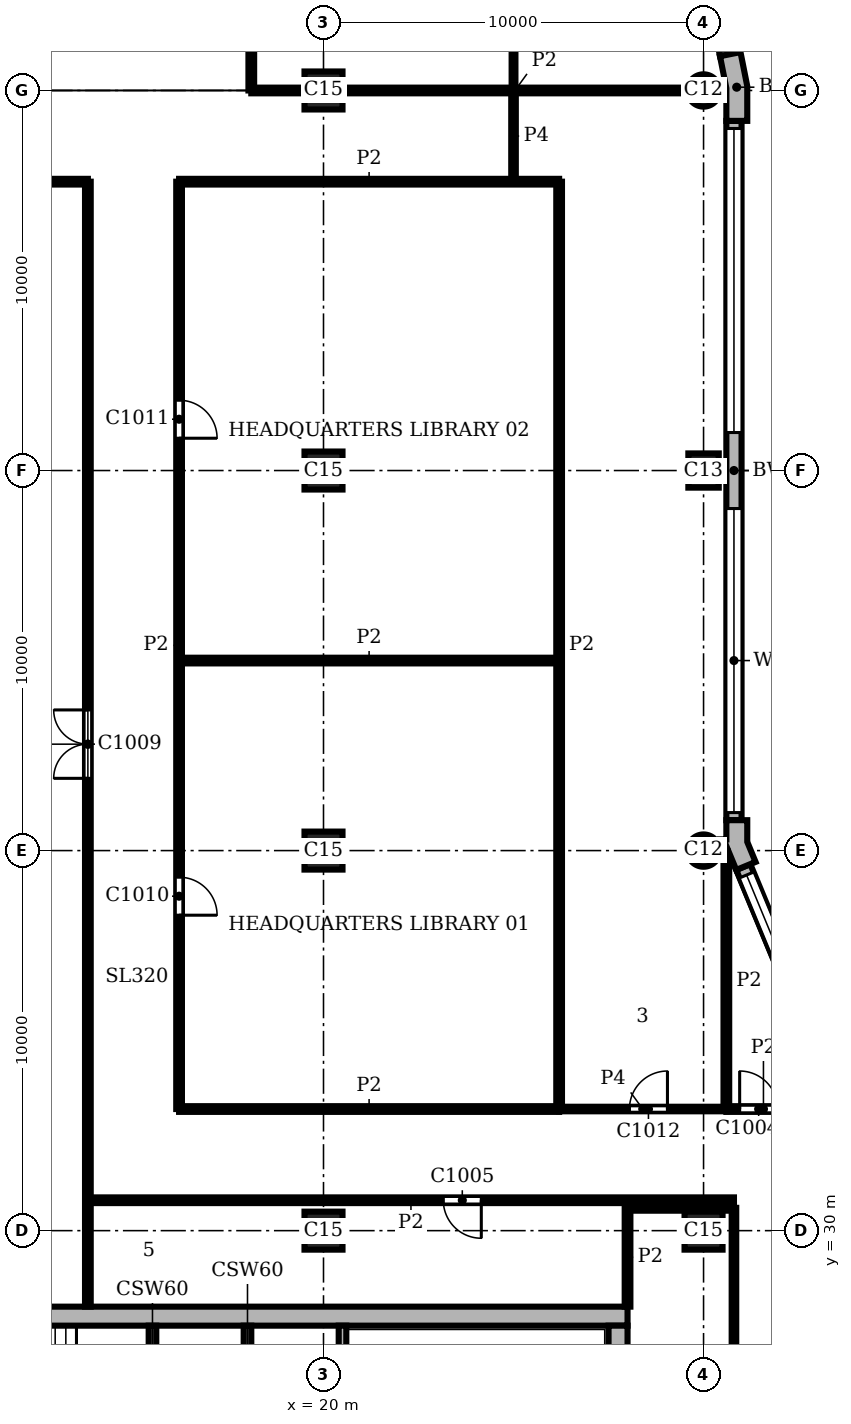
"""IFC4 building model, lengths in metres.
Left out: names, types, materials, properties, quantities, classifications, styles, units other than length and angle.
Written with IfcOpenShell. Run it as: python <this file> out.ifc"""

import sys

from ifc_helpers import new_model, si_unit, direction, frame, frame_2d, origin, origin_2d, place, context, subcontext, project, spatial, polyline, rectangle, circle, outline, extrude, element, fill, save


model = new_model("IFC4")
c1 = context("Model", 3, precision=1e-05, world=origin(), true_north=direction((0.0, 1.0)))
c2 = subcontext(c1, "Body", "Model", "MODEL_VIEW")
j1 = project(units=[si_unit("LENGTHUNIT", "METRE"), si_unit("PLANEANGLEUNIT", "RADIAN")], contexts=[c1])
p1 = place(None, origin())
s1 = spatial("IfcSite", under=j1, at=p1, CompositionType="ELEMENT")
p2 = place(p1, origin())
s2 = spatial("IfcBuilding", under=s1, at=p2, CompositionType="ELEMENT")
p3 = place(p2, frame((0.0, 0.0, 348.9)))
s3 = spatial("IfcBuildingStorey", under=s2, at=p3, CompositionType="ELEMENT", Elevation=348.9)
p4 = place(p3, frame((30.0, 40.0, 0.0), z_axis=(0.0, 0.0, 1.0), x_axis=(1.0, 0.0, 0.0)))
e1 = element("IfcColumn", 1, at=p4, inside=s3, PredefinedType="COLUMN", context=c2, shape_type="SweptSolid", body=[
    extrude(circle(Radius=0.425, at=origin_2d()), origin(), (0.0, 0.0, 1.0), 3.9),
])
p5 = place(p3, frame((30.0, 50.0, 0.0), z_axis=(0.0, 0.0, 1.0), x_axis=(0.0, 1.0, 0.0)))
e2 = element("IfcColumn", 2, at=p5, inside=s3, PredefinedType="COLUMN", context=c2, shape_type="SweptSolid", body=[
    extrude(rectangle(XDim=0.9, YDim=0.8, at=origin_2d()), origin(), (0.0, 0.0, 1.0), 3.9),
])
p6 = place(p3, frame((30.0, 60.0, 0.0), z_axis=(0.0, 0.0, 1.0), x_axis=(1.0, 0.0, 0.0)))
e3 = element("IfcColumn", 3, at=p6, inside=s3, PredefinedType="COLUMN", context=c2, shape_type="SweptSolid", body=[
    extrude(circle(Radius=0.425, at=origin_2d()), origin(), (0.0, 0.0, 1.0), 3.9),
])
for number, where, z_axis, x_axis in (
    (4, (20.0, 30.0, 0.0), (0.0, 0.0, 1.0), (1.0, 0.0, 0.0)),
    (5, (20.0, 40.0, 0.0), (0.0, 0.0, 1.0), (1.0, 0.0, 0.0)),
    (6, (20.0, 50.0, 0.0), (0.0, 0.0, 1.0), (1.0, 0.0, 0.0)),
    (7, (20.0, 60.0, 0.0), (0.0, 0.0, 1.0), (1.0, 0.0, 0.0)),
    (8, (30.0, 30.0, 0.0), (0.0, 0.0, 1.0), (1.0, 0.0, 0.0)),
):
    element("IfcColumn", number, at=place(p3, frame(where, z_axis=z_axis, x_axis=x_axis)), inside=s3, PredefinedType="COLUMN", context=c2, shape_type="SweptSolid", body=[
        extrude(rectangle(XDim=1.0, YDim=1.0, at=origin_2d()), origin(), (0.0, 0.0, 1.0), 3.9),
    ])
p7 = place(p3, frame((27.75, 8.5, 0.0), z_axis=(0.0, 0.0, 1.0), x_axis=(0.0, 1.0, 0.0)))
e9 = element("IfcWall", 9, at=p7, inside=s3, PredefinedType="SHEAR", context=c2, shape_type="SweptSolid", body=[
    extrude(rectangle(XDim=19.0, YDim=0.5, at=frame_2d((9.5, 0.0))), origin(), (0.0, 0.0, 1.0), 3.9),
])
p8 = place(p7, frame((4.95, 0.0, 0.0)))
e10 = element("IfcOpeningElement", 10, at=p8, cuts=e9, PredefinedType="OPENING", context=c2, shape_type="SweptSolid", body=[
    extrude(rectangle(XDim=1.6, YDim=2.1, at=frame_2d((0.8, 1.05))), frame((0.0, 0.26, 0.0), z_axis=(0.0, -1.0, 0.0), x_axis=(1.0, 0.0, 0.0)), (0.0, 0.0, 1.0), 0.52),
])
p9 = place(p3, frame((28.0, 27.75, 0.0), z_axis=(0.0, 0.0, 1.0), x_axis=(-1.0, 0.0, 0.0)))
e11 = element("IfcWall", 11, at=p9, inside=s3, PredefinedType="SHEAR", context=c2, shape_type="SweptSolid", body=[
    extrude(rectangle(XDim=20.0, YDim=0.5, at=frame_2d((10.0, 0.0))), origin(), (0.0, 0.0, 1.0), 3.9),
])
p10 = place(p3, origin())
e12 = element("IfcWall", 12, at=p10, inside=s3, PredefinedType="SOLIDWALL", context=c2, shape_type="SweptSolid", body=[
    extrude(outline(polyline([(30.62, 39.995), (30.62, 40.071), (30.861, 39.49), (31.23, 39.644), (31.369, 39.701), (31.15, 40.229), (31.15, 40.8), (31.0, 40.8), (30.6, 40.8), (30.6, 40.295), (30.425, 40.295), (30.425, 39.995), (30.62, 39.995)])), origin(), (0.0, 0.0, 1.0), 3.9),
])
e13 = element("IfcWall", 13, at=p10, inside=s3, PredefinedType="SOLIDWALL", context=c2, shape_type="SweptSolid", body=[
    extrude(outline(polyline([(31.0, 59.2), (31.15, 59.2), (31.15, 60.113), (30.972, 61.009), (30.825, 60.98), (30.432, 60.902), (30.6, 60.059), (30.6, 59.2), (31.0, 59.2)])), origin(), (0.0, 0.0, 1.0), 3.9),
])
p11 = place(p3, frame((33.362, 33.974, 0.0), z_axis=(0.0, 0.0, 1.0), x_axis=(-0.382655745237, 0.923891000409, 0.0)))
e14 = element("IfcWall", 14, at=p11, inside=s3, PredefinedType="SOLIDWALL", context=c2, shape_type="SweptSolid", body=[
    extrude(rectangle(XDim=6.053, YDim=0.4, at=frame_2d((3.027, 0.0))), origin(), (0.0, 0.0, 1.0), 3.9),
])
p12 = place(p11, frame((0.227, 0.0, 0.9)))
e15 = element("IfcOpeningElement", 15, at=p12, cuts=e14, PredefinedType="OPENING", context=c2, shape_type="SweptSolid", body=[
    extrude(rectangle(XDim=5.6, YDim=2.35, at=frame_2d((2.8, 1.175))), frame((0.0, 0.21, 0.0), z_axis=(0.0, -1.0, 0.0), x_axis=(1.0, 0.0, 0.0)), (0.0, 0.0, 1.0), 0.42),
])
p13 = place(p3, frame((30.8, 40.8, 0.0), z_axis=(0.0, 0.0, 1.0), x_axis=(0.0, 1.0, 0.0)))
e16 = element("IfcWall", 16, at=p13, inside=s3, PredefinedType="SOLIDWALL", context=c2, shape_type="SweptSolid", body=[
    extrude(rectangle(XDim=18.4, YDim=0.4, at=frame_2d((9.2, 0.0))), origin(), (0.0, 0.0, 1.0), 3.9),
])
p14 = place(p13, frame((0.2, 0.0, 0.9)))
e17 = element("IfcOpeningElement", 17, at=p14, cuts=e16, PredefinedType="OPENING", context=c2, shape_type="SweptSolid", body=[
    extrude(rectangle(XDim=8.0, YDim=2.35, at=frame_2d((4.0, 1.175))), frame((0.0, 0.21, 0.0), z_axis=(0.0, -1.0, 0.0), x_axis=(1.0, 0.0, 0.0)), (0.0, 0.0, 1.0), 0.42),
])
p15 = place(p13, frame((10.2, 0.0, 0.9)))
e18 = element("IfcOpeningElement", 18, at=p15, cuts=e16, PredefinedType="OPENING", context=c2, shape_type="SweptSolid", body=[
    extrude(rectangle(XDim=8.0, YDim=2.35, at=frame_2d((4.0, 1.175))), frame((0.0, 0.21, 0.0), z_axis=(0.0, -1.0, 0.0), x_axis=(1.0, 0.0, 0.0)), (0.0, 0.0, 1.0), 0.42),
])
p16 = place(p3, frame((30.629, 60.941, 0.0), z_axis=(0.0, 0.0, 1.0), x_axis=(-0.195098533057, 0.98078364709, 0.0)))
e19 = element("IfcWall", 19, at=p16, inside=s3, PredefinedType="SOLIDWALL", context=c2, shape_type="SweptSolid", body=[
    extrude(rectangle(XDim=4.753, YDim=0.4, at=frame_2d((2.376, 0.0))), origin(), (0.0, 0.0, 1.0), 3.9),
])
p17 = place(p16, frame((0.226, 0.0, 0.9)))
e20 = element("IfcOpeningElement", 20, at=p17, cuts=e19, PredefinedType="OPENING", context=c2, shape_type="SweptSolid", body=[
    extrude(rectangle(XDim=4.3, YDim=2.35, at=frame_2d((2.15, 1.175))), frame((0.0, 0.21, 0.0), z_axis=(0.0, -1.0, 0.0), x_axis=(1.0, 0.0, 0.0)), (0.0, 0.0, 1.0), 0.42),
])
p18 = place(p3, frame((15.5, 23.6, 0.0), z_axis=(0.0, 0.0, 1.0), x_axis=(0.0, 1.0, 0.0)))
e21 = element("IfcWall", 21, at=p18, inside=s3, PredefinedType="SHEAR", context=c2, shape_type="SweptSolid", body=[
    extrude(rectangle(XDim=3.9, YDim=0.2, at=frame_2d((1.95, 0.0))), origin(), (0.0, 0.0, 1.0), 3.45),
])
p19 = place(p3, frame((18.0, 20.0, 0.0), z_axis=(0.0, 0.0, 1.0), x_axis=(0.0, 1.0, 0.0)))
e22 = element("IfcWall", 22, at=p19, inside=s3, PredefinedType="SHEAR", context=c2, shape_type="SweptSolid", body=[
    extrude(rectangle(XDim=7.5, YDim=0.2, at=frame_2d((3.75, 0.0))), origin(), (0.0, 0.0, 1.0), 3.45),
])
p20 = place(p19, frame((1.2, 0.0, 0.0)))
e23 = element("IfcOpeningElement", 23, at=p20, cuts=e22, PredefinedType="OPENING", context=c2, shape_type="SweptSolid", body=[
    extrude(rectangle(XDim=1.2, YDim=2.1, at=frame_2d((0.6, 1.05))), frame((0.0, 0.11, 0.0), z_axis=(0.0, -1.0, 0.0), x_axis=(1.0, 0.0, 0.0)), (0.0, 0.0, 1.0), 0.22),
])
p21 = place(p3, frame((20.5, 23.6, 0.0), z_axis=(0.0, 0.0, 1.0), x_axis=(0.0, 1.0, 0.0)))
e24 = element("IfcWall", 24, at=p21, inside=s3, PredefinedType="SHEAR", context=c2, shape_type="SweptSolid", body=[
    extrude(rectangle(XDim=3.9, YDim=0.2, at=frame_2d((1.95, 0.0))), origin(), (0.0, 0.0, 1.0), 3.45),
])
p22 = place(p3, frame((25.0, 60.0, 0.0), z_axis=(0.0, 0.0, 1.0), x_axis=(0.0, 1.0, 0.0)))
e25 = element("IfcWall", 25, at=p22, inside=s3, PredefinedType="PARTITIONING", context=c2, shape_type="SweptSolid", body=[
    extrude(rectangle(XDim=8.0, YDim=0.1, at=frame_2d((4.0, 0.0))), origin(), (0.0, 0.0, 1.0), 3.45),
])
p23 = place(p22, frame((2.6, 0.0, 0.0)))
e26 = element("IfcOpeningElement", 26, at=p23, cuts=e25, PredefinedType="OPENING", context=c2, shape_type="SweptSolid", body=[
    extrude(rectangle(XDim=0.9, YDim=2.1, at=frame_2d((0.45, 1.05))), frame((0.0, 0.06, 0.0), z_axis=(0.0, -1.0, 0.0), x_axis=(1.0, 0.0, 0.0)), (0.0, 0.0, 1.0), 0.12),
])
p24 = place(p3, frame((13.8, 28.0, 0.0), z_axis=(0.0, 0.0, 1.0), x_axis=(0.0, 1.0, 0.0)))
e27 = element("IfcWall", 27, at=p24, inside=s3, PredefinedType="PARTITIONING", context=c2, shape_type="SweptSolid", body=[
    extrude(rectangle(XDim=29.6, YDim=0.15, at=frame_2d((14.8, 0.0))), origin(), (0.0, 0.0, 1.0), 3.45),
])
p25 = place(p24, frame((13.901, 0.0, 0.0)))
e28 = element("IfcOpeningElement", 28, at=p25, cuts=e27, PredefinedType="OPENING", context=c2, shape_type="SweptSolid", body=[
    extrude(rectangle(XDim=1.8, YDim=2.1, at=frame_2d((0.9, 1.05))), frame((0.0, 0.085, 0.0), z_axis=(0.0, -1.0, 0.0), x_axis=(1.0, 0.0, 0.0)), (0.0, 0.0, 1.0), 0.17),
])
p26 = place(p3, frame((16.2, 33.2, 0.0), z_axis=(0.0, 0.0, 1.0), x_axis=(0.0, 1.0, 0.0)))
e29 = element("IfcWall", 29, at=p26, inside=s3, PredefinedType="PARTITIONING", context=c2, shape_type="SweptSolid", body=[
    extrude(rectangle(XDim=24.4, YDim=0.15, at=frame_2d((12.2, 0.0))), origin(), (0.0, 0.0, 1.0), 3.45),
])
p27 = place(p26, frame((5.1, 0.0, 0.0)))
e30 = element("IfcOpeningElement", 30, at=p27, cuts=e29, PredefinedType="OPENING", context=c2, shape_type="SweptSolid", body=[
    extrude(rectangle(XDim=1.0, YDim=2.1, at=frame_2d((0.5, 1.05))), frame((0.0, 0.085, 0.0), z_axis=(0.0, -1.0, 0.0), x_axis=(1.0, 0.0, 0.0)), (0.0, 0.0, 1.0), 0.17),
])
p28 = place(p26, frame((17.65, 0.0, 0.0)))
e31 = element("IfcOpeningElement", 31, at=p28, cuts=e29, PredefinedType="OPENING", context=c2, shape_type="SweptSolid", body=[
    extrude(rectangle(XDim=1.0, YDim=2.1, at=frame_2d((0.5, 1.05))), frame((0.0, 0.085, 0.0), z_axis=(0.0, -1.0, 0.0), x_axis=(1.0, 0.0, 0.0)), (0.0, 0.0, 1.0), 0.17),
])
p29 = place(p3, frame((18.1, 60.0, 0.0), z_axis=(0.0, 0.0, 1.0), x_axis=(0.0, 1.0, 0.0)))
e32 = element("IfcWall", 32, at=p29, inside=s3, PredefinedType="PARTITIONING", context=c2, shape_type="SweptSolid", body=[
    extrude(rectangle(XDim=6.4, YDim=0.15, at=frame_2d((3.2, 0.0))), origin(), (0.0, 0.0, 1.0), 3.45),
])
p30 = place(p29, frame((2.35, 0.0, 0.0)))
e33 = element("IfcOpeningElement", 33, at=p30, cuts=e32, PredefinedType="OPENING", context=c2, shape_type="SweptSolid", body=[
    extrude(rectangle(XDim=1.0, YDim=2.1, at=frame_2d((0.5, 1.05))), frame((0.0, 0.085, 0.0), z_axis=(0.0, -1.0, 0.0), x_axis=(1.0, 0.0, 0.0)), (0.0, 0.0, 1.0), 0.17),
])
p31 = place(p3, frame((26.2, 33.2, 0.0), z_axis=(0.0, 0.0, 1.0), x_axis=(0.0, 1.0, 0.0)))
e34 = element("IfcWall", 34, at=p31, inside=s3, PredefinedType="PARTITIONING", context=c2, shape_type="SweptSolid", body=[
    extrude(rectangle(XDim=24.4, YDim=0.15, at=frame_2d((12.2, 0.0))), origin(), (0.0, 0.0, 1.0), 3.45),
])
p32 = place(p3, frame((28.0, 28.0, 0.0), z_axis=(0.0, 0.0, 1.0), x_axis=(0.0, 1.0, 0.0)))
e35 = element("IfcWall", 35, at=p32, inside=s3, PredefinedType="PARTITIONING", context=c2, shape_type="SweptSolid", body=[
    extrude(rectangle(XDim=2.598, YDim=0.15, at=frame_2d((1.299, 0.0))), origin(), (0.0, 0.0, 1.0), 3.45),
])
p33 = place(p3, frame((30.6, 33.2, 0.0), z_axis=(0.0, 0.0, 1.0), x_axis=(0.0, 1.0, 0.0)))
e36 = element("IfcWall", 36, at=p33, inside=s3, PredefinedType="PARTITIONING", context=c2, shape_type="SweptSolid", body=[
    extrude(rectangle(XDim=6.738, YDim=0.15, at=frame_2d((3.369, 0.0))), origin(), (0.0, 0.0, 1.0), 3.45),
])
p34 = place(p3, frame((28.002, 30.6, 0.0), z_axis=(0.0, 0.0, 1.0), x_axis=(1.0, 0.0, 0.0)))
e37 = element("IfcWall", 37, at=p34, inside=s3, PredefinedType="PARTITIONING", context=c2, shape_type="SweptSolid", body=[
    extrude(rectangle(XDim=2.798, YDim=0.15, at=frame_2d((1.399, 0.0))), origin(), (0.0, 0.0, 1.0), 3.45),
])
p35 = place(p3, frame((13.802, 30.8, 0.0), z_axis=(0.0, 0.0, 1.0), x_axis=(1.0, 0.0, 0.0)))
e38 = element("IfcWall", 38, at=p35, inside=s3, PredefinedType="PARTITIONING", context=c2, shape_type="SweptSolid", body=[
    extrude(rectangle(XDim=16.998, YDim=0.15, at=frame_2d((8.499, 0.0))), origin(), (0.0, 0.0, 1.0), 3.45),
])
p36 = place(p35, frame((9.35, 0.0, 0.0)))
e39 = element("IfcOpeningElement", 39, at=p36, cuts=e38, PredefinedType="OPENING", context=c2, shape_type="SweptSolid", body=[
    extrude(rectangle(XDim=1.0, YDim=2.1, at=frame_2d((0.5, 1.05))), frame((0.0, 0.085, 0.0), z_axis=(0.0, -1.0, 0.0), x_axis=(1.0, 0.0, 0.0)), (0.0, 0.0, 1.0), 0.17),
])
p37 = place(p3, frame((16.2, 33.2, 0.0), z_axis=(0.0, 0.0, 1.0), x_axis=(1.0, 0.0, 0.0)))
e40 = element("IfcWall", 40, at=p37, inside=s3, PredefinedType="PARTITIONING", context=c2, shape_type="SweptSolid", body=[
    extrude(rectangle(XDim=10.0, YDim=0.15, at=frame_2d((5.0, 0.0))), origin(), (0.0, 0.0, 1.0), 3.45),
])
p38 = place(p3, frame((30.6, 33.2, 0.0), z_axis=(0.0, 0.0, 1.0), x_axis=(1.0, 0.0, 0.0)))
e41 = element("IfcWall", 41, at=p38, inside=s3, PredefinedType="PARTITIONING", context=c2, shape_type="SweptSolid", body=[
    extrude(rectangle(XDim=1.952, YDim=0.15, at=frame_2d((0.976, 0.0))), origin(), (0.0, 0.0, 1.0), 3.45),
])
p39 = place(p38, frame((0.35, 0.0, 0.0)))
e42 = element("IfcOpeningElement", 42, at=p39, cuts=e41, PredefinedType="OPENING", context=c2, shape_type="SweptSolid", body=[
    extrude(rectangle(XDim=1.0, YDim=2.1, at=frame_2d((0.5, 1.05))), frame((0.0, 0.085, 0.0), z_axis=(0.0, -1.0, 0.0), x_axis=(1.0, 0.0, 0.0)), (0.0, 0.0, 1.0), 0.17),
])
p40 = place(p3, frame((16.2, 45.0, 0.0), z_axis=(0.0, 0.0, 1.0), x_axis=(1.0, 0.0, 0.0)))
e43 = element("IfcWall", 43, at=p40, inside=s3, PredefinedType="PARTITIONING", context=c2, shape_type="SweptSolid", body=[
    extrude(rectangle(XDim=10.0, YDim=0.15, at=frame_2d((5.0, 0.0))), origin(), (0.0, 0.0, 1.0), 3.45),
])
p41 = place(p3, frame((5.0, 57.6, 0.0), z_axis=(0.0, 0.0, 1.0), x_axis=(1.0, 0.0, 0.0)))
e44 = element("IfcWall", 44, at=p41, inside=s3, PredefinedType="PARTITIONING", context=c2, shape_type="SweptSolid", body=[
    extrude(rectangle(XDim=8.8, YDim=0.15, at=frame_2d((4.4, 0.0))), origin(), (0.0, 0.0, 1.0), 3.45),
])
p42 = place(p3, frame((16.2, 57.6, 0.0), z_axis=(0.0, 0.0, 1.0), x_axis=(1.0, 0.0, 0.0)))
e45 = element("IfcWall", 45, at=p42, inside=s3, PredefinedType="PARTITIONING", context=c2, shape_type="SweptSolid", body=[
    extrude(rectangle(XDim=10.0, YDim=0.15, at=frame_2d((5.0, 0.0))), origin(), (0.0, 0.0, 1.0), 3.45),
])
p43 = place(p3, frame((18.1, 60.0, 0.0), z_axis=(0.0, 0.0, 1.0), x_axis=(1.0, 0.0, 0.0)))
e46 = element("IfcWall", 46, at=p43, inside=s3, PredefinedType="PARTITIONING", context=c2, shape_type="SweptSolid", body=[
    extrude(rectangle(XDim=1.4, YDim=0.15, at=frame_2d((0.7, 0.0))), origin(), (0.0, 0.0, 1.0), 3.45),
])
p44 = place(p3, frame((20.5, 60.0, 0.0), z_axis=(0.0, 0.0, 1.0), x_axis=(1.0, 0.0, 0.0)))
e47 = element("IfcWall", 47, at=p44, inside=s3, PredefinedType="PARTITIONING", context=c2, shape_type="SweptSolid", body=[
    extrude(rectangle(XDim=9.075, YDim=0.15, at=frame_2d((4.538, 0.0))), origin(), (0.0, 0.0, 1.0), 3.45),
])
p45 = place(p3, frame((25.0, 57.6, 0.0), z_axis=(0.0, 0.0, 1.0), x_axis=(0.0, 1.0, 0.0)))
e48 = element("IfcWall", 48, at=p45, inside=s3, PredefinedType="PARTITIONING", context=c2, shape_type="SweptSolid", body=[
    extrude(rectangle(XDim=2.4, YDim=0.12, at=frame_2d((1.2, 0.0))), origin(), (0.0, 0.0, 1.0), 3.45),
])
p46 = place(p3, frame((30.8, 15.45, 0.0), z_axis=(0.0, 0.0, 1.0), x_axis=(0.0, 1.0, 0.0)))
e49 = element("IfcWall", 49, at=p46, inside=s3, PredefinedType="PARTITIONING", context=c2, shape_type="SweptSolid", body=[
    extrude(rectangle(XDim=15.15, YDim=0.12, at=frame_2d((7.575, 0.0))), origin(), (0.0, 0.0, 1.0), 3.45),
])
p47 = place(p46, frame((6.1, 0.0, 0.0)))
e50 = element("IfcOpeningElement", 50, at=p47, cuts=e49, PredefinedType="OPENING", context=c2, shape_type="SweptSolid", body=[
    extrude(rectangle(XDim=1.0, YDim=2.1, at=frame_2d((0.5, 1.05))), frame((0.0, 0.07, 0.0), z_axis=(0.0, -1.0, 0.0), x_axis=(1.0, 0.0, 0.0)), (0.0, 0.0, 1.0), 0.14),
])
p48 = place(p3, frame((26.2, 33.2, 0.0), z_axis=(0.0, 0.0, 1.0), x_axis=(1.0, 0.0, 0.0)))
e51 = element("IfcWall", 51, at=p48, inside=s3, PredefinedType="PARTITIONING", context=c2, shape_type="SweptSolid", body=[
    extrude(rectangle(XDim=4.4, YDim=0.12, at=frame_2d((2.2, 0.0))), origin(), (0.0, 0.0, 1.0), 3.45),
])
p49 = place(p48, frame((1.85, 0.0, 0.0)))
e52 = element("IfcOpeningElement", 52, at=p49, cuts=e51, PredefinedType="OPENING", context=c2, shape_type="SweptSolid", body=[
    extrude(rectangle(XDim=1.0, YDim=2.1, at=frame_2d((0.5, 1.05))), frame((0.0, 0.07, 0.0), z_axis=(0.0, -1.0, 0.0), x_axis=(1.0, 0.0, 0.0)), (0.0, 0.0, 1.0), 0.14),
])
p50 = place(p12, origin())
e53 = element("IfcWindow", 53, at=p50, inside=s3, PartitioningType="SINGLE_PANEL", PredefinedType="WINDOW", context=c2, shape_type="SweptSolid", body=[
    extrude(rectangle(XDim=5.6, YDim=2.35, at=frame_2d((2.8, 1.175))), frame((0.0, 0.16, 0.0), z_axis=(0.0, -1.0, 0.0), x_axis=(1.0, 0.0, 0.0)), (0.0, 0.0, 1.0), 0.06),
])
fill(e15, e53)
p51 = place(p14, origin())
e54 = element("IfcWindow", 54, at=p51, inside=s3, PartitioningType="SINGLE_PANEL", PredefinedType="WINDOW", context=c2, shape_type="SweptSolid", body=[
    extrude(rectangle(XDim=8.0, YDim=2.35, at=frame_2d((4.0, 1.175))), frame((0.0, 0.16, 0.0), z_axis=(0.0, -1.0, 0.0), x_axis=(1.0, 0.0, 0.0)), (0.0, 0.0, 1.0), 0.06),
])
fill(e17, e54)
p52 = place(p15, origin())
e55 = element("IfcWindow", 55, at=p52, inside=s3, PartitioningType="SINGLE_PANEL", PredefinedType="WINDOW", context=c2, shape_type="SweptSolid", body=[
    extrude(rectangle(XDim=8.0, YDim=2.35, at=frame_2d((4.0, 1.175))), frame((0.0, 0.16, 0.0), z_axis=(0.0, -1.0, 0.0), x_axis=(1.0, 0.0, 0.0)), (0.0, 0.0, 1.0), 0.06),
])
fill(e18, e55)
p53 = place(p39, origin())
e56 = element("IfcDoor", 56, at=p53, inside=s3, OperationType="SINGLE_SWING_LEFT", PredefinedType="DOOR", context=c2, shape_type="SweptSolid", body=[
    extrude(rectangle(XDim=1.0, YDim=2.1, at=frame_2d((0.5, 1.05))), frame((0.0, 0.025, 0.0), z_axis=(0.0, -1.0, 0.0), x_axis=(1.0, 0.0, 0.0)), (0.0, 0.0, 1.0), 0.05),
])
fill(e42, e56)
p54 = place(p36, frame((1.0, 0.0, 0.0), z_axis=(0.0, 0.0, 1.0), x_axis=(-1.0, 0.0, 0.0)))
e57 = element("IfcDoor", 57, at=p54, inside=s3, OperationType="SINGLE_SWING_LEFT", PredefinedType="DOOR", context=c2, shape_type="SweptSolid", body=[
    extrude(rectangle(XDim=1.0, YDim=2.1, at=frame_2d((0.5, 1.05))), frame((0.0, 0.025, 0.0), z_axis=(0.0, -1.0, 0.0), x_axis=(1.0, 0.0, 0.0)), (0.0, 0.0, 1.0), 0.05),
])
fill(e39, e57)
p55 = place(p25, origin())
e58 = element("IfcDoor", 58, at=p55, inside=s3, OperationType="DOUBLE_DOOR_SINGLE_SWING", PredefinedType="DOOR", context=c2, shape_type="SweptSolid", body=[
    extrude(rectangle(XDim=1.8, YDim=2.1, at=frame_2d((0.9, 1.05))), frame((0.0, 0.025, 0.0), z_axis=(0.0, -1.0, 0.0), x_axis=(1.0, 0.0, 0.0)), (0.0, 0.0, 1.0), 0.05),
])
fill(e28, e58)
p56 = place(p27, frame((1.0, 0.0, 0.0), z_axis=(0.0, 0.0, 1.0), x_axis=(-1.0, 0.0, 0.0)))
e59 = element("IfcDoor", 59, at=p56, inside=s3, OperationType="SINGLE_SWING_RIGHT", PredefinedType="DOOR", context=c2, shape_type="SweptSolid", body=[
    extrude(rectangle(XDim=1.0, YDim=2.1, at=frame_2d((0.5, 1.05))), frame((0.0, 0.025, 0.0), z_axis=(0.0, -1.0, 0.0), x_axis=(1.0, 0.0, 0.0)), (0.0, 0.0, 1.0), 0.05),
])
fill(e30, e59)
p57 = place(p28, frame((1.0, 0.0, 0.0), z_axis=(0.0, 0.0, 1.0), x_axis=(-1.0, 0.0, 0.0)))
e60 = element("IfcDoor", 60, at=p57, inside=s3, OperationType="SINGLE_SWING_RIGHT", PredefinedType="DOOR", context=c2, shape_type="SweptSolid", body=[
    extrude(rectangle(XDim=1.0, YDim=2.1, at=frame_2d((0.5, 1.05))), frame((0.0, 0.025, 0.0), z_axis=(0.0, -1.0, 0.0), x_axis=(1.0, 0.0, 0.0)), (0.0, 0.0, 1.0), 0.05),
])
fill(e31, e60)
p58 = place(p49, origin())
e61 = element("IfcDoor", 61, at=p58, inside=s3, OperationType="SINGLE_SWING_RIGHT", PredefinedType="DOOR", context=c2, shape_type="SweptSolid", body=[
    extrude(rectangle(XDim=1.0, YDim=2.1, at=frame_2d((0.5, 1.05))), frame((0.0, 0.025, 0.0), z_axis=(0.0, -1.0, 0.0), x_axis=(1.0, 0.0, 0.0)), (0.0, 0.0, 1.0), 0.05),
])
fill(e52, e61)
save(model, sys.argv[1])
